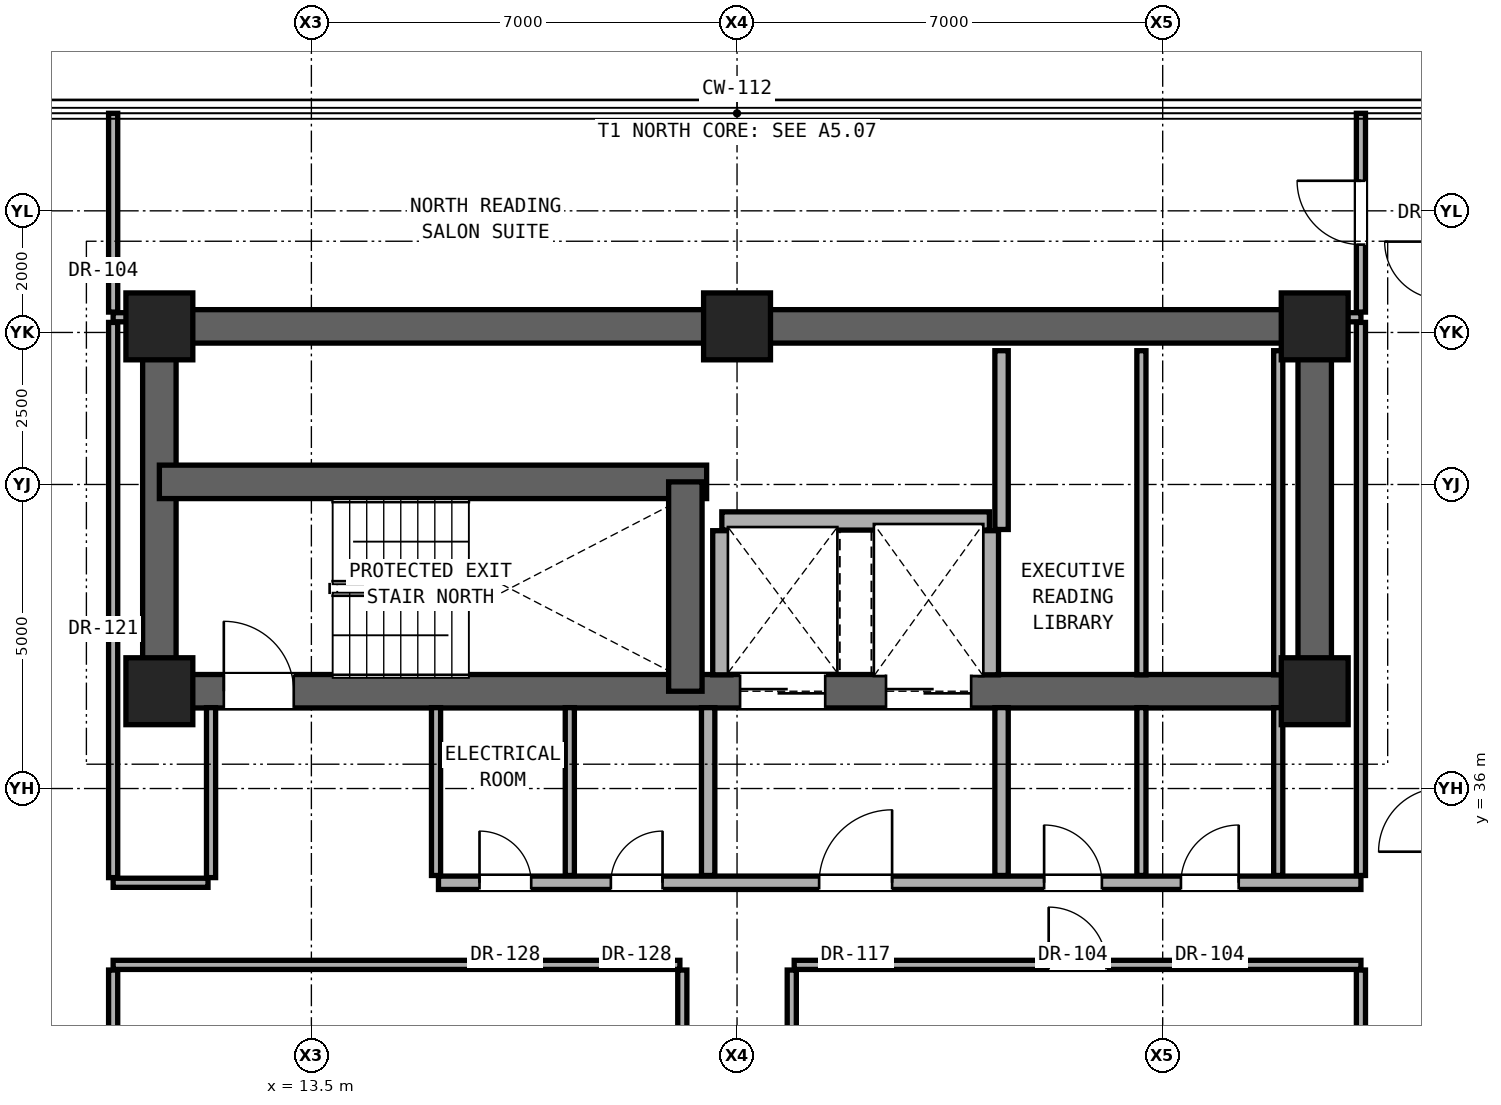
"""IFC4 building model, lengths in metres.
Left out: names, types, materials, properties, quantities, classifications, styles, units other than length and angle.
Written with IfcOpenShell. Run it as: python <this file> out.ifc"""

import sys

from ifc_helpers import new_model, si_unit, direction, frame, frame_2d, origin, origin_2d, place, context, subcontext, project, spatial, rectangle, extrude, element, fill, save


model = new_model("IFC4")
c1 = context("Model", 3, precision=1e-05, world=origin(), true_north=direction((0.0, 1.0)))
c2 = subcontext(c1, "Body", "Model", "MODEL_VIEW")
j1 = project(units=[si_unit("LENGTHUNIT", "METRE"), si_unit("PLANEANGLEUNIT", "RADIAN")], contexts=[c1])
p1 = place(None, origin())
s1 = spatial("IfcSite", under=j1, at=p1, CompositionType="ELEMENT")
p2 = place(p1, origin())
s2 = spatial("IfcBuilding", under=s1, at=p2, CompositionType="ELEMENT")
p3 = place(p2, frame((0.0, 0.0, 144.5)))
s3 = spatial("IfcBuildingStorey", under=s2, at=p3, CompositionType="ELEMENT", Elevation=144.5)
for number, where, z_axis, x_axis in (
    (1, (11.0, 37.6, 0.0), (0.0, 0.0, 1.0), (1.0, 0.0, 0.0)),
    (2, (30.0, 37.6, 0.0), (0.0, 0.0, 1.0), (1.0, 0.0, 0.0)),
    (3, (11.0, 43.6, 0.0), (0.0, 0.0, 1.0), (1.0, 0.0, 0.0)),
    (4, (20.5, 43.6, 0.0), (0.0, 0.0, 1.0), (1.0, 0.0, 0.0)),
    (5, (30.0, 43.6, 0.0), (0.0, 0.0, 1.0), (1.0, 0.0, 0.0)),
):
    element("IfcColumn", number, at=place(p3, frame(where, z_axis=z_axis, x_axis=x_axis)), inside=s3, PredefinedType="COLUMN", context=c2, shape_type="SweptSolid", body=[
        extrude(rectangle(XDim=1.1, YDim=1.1, at=origin_2d()), origin(), (0.0, 0.0, 1.0), 3.3),
    ])
p4 = place(p3, frame((11.0, 43.6, 0.0), z_axis=(0.0, 0.0, 1.0), x_axis=(1.0, 0.0, 0.0)))
e6 = element("IfcWall", 6, at=p4, inside=s3, PredefinedType="SHEAR", context=c2, shape_type="SweptSolid", body=[
    extrude(rectangle(XDim=19.0, YDim=0.55, at=frame_2d((9.5, 0.0))), origin(), (0.0, 0.0, 1.0), 2.94),
])
for number, where, z_axis, x_axis in (
    (7, (11.0, 37.6, 0.0), (0.0, 0.0, 1.0), (0.0, 1.0, 0.0)),
    (8, (30.0, 37.6, 0.0), (0.0, 0.0, 1.0), (0.0, 1.0, 0.0)),
):
    element("IfcWall", number, at=place(p3, frame(where, z_axis=z_axis, x_axis=x_axis)), inside=s3, PredefinedType="SHEAR", context=c2, shape_type="SweptSolid", body=[
        extrude(rectangle(XDim=6.0, YDim=0.55, at=frame_2d((3.0, 0.0))), origin(), (0.0, 0.0, 1.0), 2.94),
    ])
p5 = place(p3, frame((11.0, 37.6, 0.0), z_axis=(0.0, 0.0, 1.0), x_axis=(1.0, 0.0, 0.0)))
e9 = element("IfcWall", 9, at=p5, inside=s3, PredefinedType="SHEAR", context=c2, shape_type="SweptSolid", body=[
    extrude(rectangle(XDim=19.0, YDim=0.55, at=frame_2d((9.5, 0.0))), origin(), (0.0, 0.0, 1.0), 2.94),
])
p6 = place(p5, frame((1.06, 0.0, 0.0)))
e10 = element("IfcOpeningElement", 10, at=p6, cuts=e9, PredefinedType="OPENING", context=c2, shape_type="SweptSolid", body=[
    extrude(rectangle(XDim=1.15, YDim=2.2, at=frame_2d((0.575, 1.1))), frame((0.0, 0.285, 0.0), z_axis=(0.0, -1.0, 0.0), x_axis=(1.0, 0.0, 0.0)), (0.0, 0.0, 1.0), 0.57),
])
p7 = place(p5, frame((9.55, 0.0, 0.0)))
e11 = element("IfcOpeningElement", 11, at=p7, cuts=e9, PredefinedType="OPENING", context=c2, shape_type="SweptSolid", body=[
    extrude(rectangle(XDim=1.4, YDim=2.35, at=frame_2d((0.7, 1.175))), frame((0.0, 0.285, 0.0), z_axis=(0.0, -1.0, 0.0), x_axis=(1.0, 0.0, 0.0)), (0.0, 0.0, 1.0), 0.57),
])
p8 = place(p5, frame((11.95, 0.0, 0.0)))
e12 = element("IfcOpeningElement", 12, at=p8, cuts=e9, PredefinedType="OPENING", context=c2, shape_type="SweptSolid", body=[
    extrude(rectangle(XDim=1.4, YDim=2.35, at=frame_2d((0.7, 1.175))), frame((0.0, 0.285, 0.0), z_axis=(0.0, -1.0, 0.0), x_axis=(1.0, 0.0, 0.0)), (0.0, 0.0, 1.0), 0.57),
])
p9 = place(p3, frame((11.0, 41.043, 0.0), z_axis=(0.0, 0.0, 1.0), x_axis=(1.0, 0.0, 0.0)))
e13 = element("IfcWall", 13, at=p9, inside=s3, PredefinedType="SHEAR", context=c2, shape_type="SweptSolid", body=[
    extrude(rectangle(XDim=9.0, YDim=0.55, at=frame_2d((4.5, 0.0))), origin(), (0.0, 0.0, 1.0), 2.94),
])
p10 = place(p3, frame((19.65, 37.6, 0.0), z_axis=(0.0, 0.0, 1.0), x_axis=(0.0, 1.0, 0.0)))
e14 = element("IfcWall", 14, at=p10, inside=s3, PredefinedType="SHEAR", context=c2, shape_type="SweptSolid", body=[
    extrude(rectangle(XDim=3.443, YDim=0.55, at=frame_2d((1.721, 0.0))), origin(), (0.0, 0.0, 1.0), 2.94),
])
p11 = place(p3, frame((10.24, 33.1, 0.0), z_axis=(0.0, 0.0, 1.0), x_axis=(1.0, 0.0, 0.0)))
e15 = element("IfcWall", 15, at=p11, inside=s3, PredefinedType="PARTITIONING", context=c2, shape_type="SweptSolid", body=[
    extrude(rectangle(XDim=9.32, YDim=0.15, at=frame_2d((4.66, 0.0))), origin(), (0.0, 0.0, 1.0), 2.316),
])
p12 = place(p3, frame((21.44, 33.1, 0.0), z_axis=(0.0, 0.0, 1.0), x_axis=(1.0, 0.0, 0.0)))
e16 = element("IfcWall", 16, at=p12, inside=s3, PredefinedType="PARTITIONING", context=c2, shape_type="SweptSolid", body=[
    extrude(rectangle(XDim=9.32, YDim=0.15, at=frame_2d((4.66, 0.0))), origin(), (0.0, 0.0, 1.0), 2.316),
])
p13 = place(p12, frame((4.185, 0.0, 0.0)))
e17 = element("IfcOpeningElement", 17, at=p13, cuts=e16, PredefinedType="OPENING", context=c2, shape_type="SweptSolid", body=[
    extrude(rectangle(XDim=0.95, YDim=2.15, at=frame_2d((0.475, 1.075))), frame((0.0, 0.085, 0.0), z_axis=(0.0, -1.0, 0.0), x_axis=(1.0, 0.0, 0.0)), (0.0, 0.0, 1.0), 0.17),
])
p14 = place(p3, frame((10.24, 34.45, 0.0), z_axis=(0.0, 0.0, 1.0), x_axis=(1.0, 0.0, 0.0)))
e18 = element("IfcWall", 18, at=p14, inside=s3, PredefinedType="PARTITIONING", context=c2, shape_type="SweptSolid", body=[
    extrude(rectangle(XDim=1.56, YDim=0.15, at=frame_2d((0.78, 0.0))), origin(), (0.0, 0.0, 1.0), 2.316),
])
p15 = place(p3, frame((15.59, 34.45, 0.0), z_axis=(0.0, 0.0, 1.0), x_axis=(1.0, 0.0, 0.0)))
e19 = element("IfcWall", 19, at=p15, inside=s3, PredefinedType="SOLIDWALL", context=c2, shape_type="SweptSolid", body=[
    extrude(rectangle(XDim=15.17, YDim=0.22, at=frame_2d((7.585, 0.0))), origin(), (0.0, 0.0, 1.0), 2.316),
])
p16 = place(p15, frame((6.26, 0.0, 0.0)))
e20 = element("IfcOpeningElement", 20, at=p16, cuts=e19, PredefinedType="OPENING", context=c2, shape_type="SweptSolid", body=[
    extrude(rectangle(XDim=1.2, YDim=2.25, at=frame_2d((0.6, 1.125))), frame((0.0, 0.12, 0.0), z_axis=(0.0, -1.0, 0.0), x_axis=(1.0, 0.0, 0.0)), (0.0, 0.0, 1.0), 0.24),
])
p17 = place(p15, frame((9.96, 0.0, 0.0)))
e21 = element("IfcOpeningElement", 21, at=p17, cuts=e19, PredefinedType="OPENING", context=c2, shape_type="SweptSolid", body=[
    extrude(rectangle(XDim=0.95, YDim=2.15, at=frame_2d((0.475, 1.075))), frame((0.0, 0.12, 0.0), z_axis=(0.0, -1.0, 0.0), x_axis=(1.0, 0.0, 0.0)), (0.0, 0.0, 1.0), 0.24),
])
p18 = place(p15, frame((12.21, 0.0, 0.0)))
e22 = element("IfcOpeningElement", 22, at=p18, cuts=e19, PredefinedType="OPENING", context=c2, shape_type="SweptSolid", body=[
    extrude(rectangle(XDim=0.95, YDim=2.15, at=frame_2d((0.475, 1.075))), frame((0.0, 0.12, 0.0), z_axis=(0.0, -1.0, 0.0), x_axis=(1.0, 0.0, 0.0)), (0.0, 0.0, 1.0), 0.24),
])
p19 = place(p15, frame((0.675, 0.0, 0.0)))
e23 = element("IfcOpeningElement", 23, at=p19, cuts=e19, PredefinedType="OPENING", context=c2, shape_type="SweptSolid", body=[
    extrude(rectangle(XDim=0.85, YDim=2.01, at=frame_2d((0.425, 1.005))), frame((0.0, 0.12, 0.0), z_axis=(0.0, -1.0, 0.0), x_axis=(1.0, 0.0, 0.0)), (0.0, 0.0, 1.0), 0.24),
])
p20 = place(p15, frame((2.835, 0.0, 0.0)))
e24 = element("IfcOpeningElement", 24, at=p20, cuts=e19, PredefinedType="OPENING", context=c2, shape_type="SweptSolid", body=[
    extrude(rectangle(XDim=0.85, YDim=2.01, at=frame_2d((0.425, 1.005))), frame((0.0, 0.12, 0.0), z_axis=(0.0, -1.0, 0.0), x_axis=(1.0, 0.0, 0.0)), (0.0, 0.0, 1.0), 0.24),
])
p21 = place(p3, frame((20.25, 40.4, 0.0), z_axis=(0.0, 0.0, 1.0), x_axis=(1.0, 0.0, 0.0)))
e25 = element("IfcWall", 25, at=p21, inside=s3, PredefinedType="SOLIDWALL", context=c2, shape_type="SweptSolid", body=[
    extrude(rectangle(XDim=4.4, YDim=0.3, at=frame_2d((2.2, 0.0))), origin(), (0.0, 0.0, 1.0), 2.94),
])
for number, where, z_axis, x_axis in (
    (26, (10.24, 43.75, 0.0), (0.0, 0.0, 1.0), (1.0, 0.0, 0.0)),
    (27, (30.27, 43.75, 0.0), (0.0, 0.0, 1.0), (1.0, 0.0, 0.0)),
):
    element("IfcWall", number, at=place(p3, frame(where, z_axis=z_axis, x_axis=x_axis)), inside=s3, PredefinedType="PARTITIONING", context=c2, shape_type="SweptSolid", body=[
        extrude(rectangle(XDim=0.49, YDim=0.15, at=frame_2d((0.245, 0.0))), origin(), (0.0, 0.0, 1.0), 2.94),
    ])
p22 = place(p3, frame((10.24, 27.485, 0.0), z_axis=(0.0, 0.0, 1.0), x_axis=(0.0, 1.0, 0.0)))
e28 = element("IfcWall", 28, at=p22, inside=s3, PredefinedType="PARTITIONING", context=c2, shape_type="SweptSolid", body=[
    extrude(rectangle(XDim=5.53, YDim=0.15, at=frame_2d((2.765, 0.0))), origin(), (0.0, 0.0, 1.0), 2.316),
])
p23 = place(p22, frame((2.29, 0.0, 0.0)))
e29 = element("IfcOpeningElement", 29, at=p23, cuts=e28, PredefinedType="OPENING", context=c2, shape_type="SweptSolid", body=[
    extrude(rectangle(XDim=0.95, YDim=2.15, at=frame_2d((0.475, 1.075))), frame((0.0, 0.085, 0.0), z_axis=(0.0, -1.0, 0.0), x_axis=(1.0, 0.0, 0.0)), (0.0, 0.0, 1.0), 0.17),
])
p24 = place(p3, frame((10.24, 34.535, 0.0), z_axis=(0.0, 0.0, 1.0), x_axis=(0.0, 1.0, 0.0)))
e30 = element("IfcWall", 30, at=p24, inside=s3, PredefinedType="PARTITIONING", context=c2, shape_type="SweptSolid", body=[
    extrude(rectangle(XDim=9.13, YDim=0.15, at=frame_2d((4.565, 0.0))), origin(), (0.0, 0.0, 1.0), 2.316),
])
p25 = place(p3, frame((10.24, 43.835, 0.0), z_axis=(0.0, 0.0, 1.0), x_axis=(0.0, 1.0, 0.0)))
e31 = element("IfcWall", 31, at=p25, inside=s3, PredefinedType="PARTITIONING", context=c2, shape_type="SweptSolid", body=[
    extrude(rectangle(XDim=3.269, YDim=0.15, at=frame_2d((1.635, 0.0))), origin(), (0.0, 0.0, 1.0), 2.94),
])
p26 = place(p3, frame((11.85, 34.535, 0.0), z_axis=(0.0, 0.0, 1.0), x_axis=(0.0, 1.0, 0.0)))
e32 = element("IfcWall", 32, at=p26, inside=s3, PredefinedType="PARTITIONING", context=c2, shape_type="SweptSolid", body=[
    extrude(rectangle(XDim=2.795, YDim=0.15, at=frame_2d((1.397, 0.0))), origin(), (0.0, 0.0, 1.0), 2.94),
])
p27 = place(p3, frame((15.55, 34.57, 0.0), z_axis=(0.0, 0.0, 1.0), x_axis=(0.0, 1.0, 0.0)))
e33 = element("IfcWall", 33, at=p27, inside=s3, PredefinedType="PARTITIONING", context=c2, shape_type="SweptSolid", body=[
    extrude(rectangle(XDim=2.76, YDim=0.15, at=frame_2d((1.38, 0.0))), origin(), (0.0, 0.0, 1.0), 2.469),
])
p28 = place(p3, frame((17.75, 34.57, 0.0), z_axis=(0.0, 0.0, 1.0), x_axis=(0.0, 1.0, 0.0)))
e34 = element("IfcWall", 34, at=p28, inside=s3, PredefinedType="PARTITIONING", context=c2, shape_type="SweptSolid", body=[
    extrude(rectangle(XDim=2.76, YDim=0.15, at=frame_2d((1.38, 0.0))), origin(), (0.0, 0.0, 1.0), 2.94),
])
p29 = place(p3, frame((19.6, 27.485, 0.0), z_axis=(0.0, 0.0, 1.0), x_axis=(0.0, 1.0, 0.0)))
e35 = element("IfcWall", 35, at=p29, inside=s3, PredefinedType="PARTITIONING", context=c2, shape_type="SweptSolid", body=[
    extrude(rectangle(XDim=5.53, YDim=0.15, at=frame_2d((2.765, 0.0))), origin(), (0.0, 0.0, 1.0), 2.316),
])
p30 = place(p3, frame((20.025, 34.57, 0.0), z_axis=(0.0, 0.0, 1.0), x_axis=(0.0, 1.0, 0.0)))
e36 = element("IfcWall", 36, at=p30, inside=s3, PredefinedType="SOLIDWALL", context=c2, shape_type="SweptSolid", body=[
    extrude(rectangle(XDim=2.76, YDim=0.22, at=frame_2d((1.38, 0.0))), origin(), (0.0, 0.0, 1.0), 2.94),
])
p31 = place(p3, frame((20.25, 37.87, 0.0), z_axis=(0.0, 0.0, 1.0), x_axis=(0.0, 1.0, 0.0)))
e37 = element("IfcWall", 37, at=p31, inside=s3, PredefinedType="SOLIDWALL", context=c2, shape_type="SweptSolid", body=[
    extrude(rectangle(XDim=2.37, YDim=0.3, at=frame_2d((1.185, 0.0))), origin(), (0.0, 0.0, 1.0), 2.94),
])
p32 = place(p3, frame((21.4, 27.485, 0.0), z_axis=(0.0, 0.0, 1.0), x_axis=(0.0, 1.0, 0.0)))
e38 = element("IfcWall", 38, at=p32, inside=s3, PredefinedType="PARTITIONING", context=c2, shape_type="SweptSolid", body=[
    extrude(rectangle(XDim=5.53, YDim=0.15, at=frame_2d((2.765, 0.0))), origin(), (0.0, 0.0, 1.0), 2.316),
])
p33 = place(p3, frame((24.65, 37.87, 0.0), z_axis=(0.0, 0.0, 1.0), x_axis=(0.0, 1.0, 0.0)))
e39 = element("IfcWall", 39, at=p33, inside=s3, PredefinedType="SOLIDWALL", context=c2, shape_type="SweptSolid", body=[
    extrude(rectangle(XDim=2.37, YDim=0.3, at=frame_2d((1.185, 0.0))), origin(), (0.0, 0.0, 1.0), 2.94),
])
p34 = place(p3, frame((24.85, 34.57, 0.0), z_axis=(0.0, 0.0, 1.0), x_axis=(0.0, 1.0, 0.0)))
e40 = element("IfcWall", 40, at=p34, inside=s3, PredefinedType="SOLIDWALL", context=c2, shape_type="SweptSolid", body=[
    extrude(rectangle(XDim=2.76, YDim=0.22, at=frame_2d((1.38, 0.0))), origin(), (0.0, 0.0, 1.0), 2.94),
])
p35 = place(p3, frame((24.85, 40.26, 0.0), z_axis=(0.0, 0.0, 1.0), x_axis=(0.0, 1.0, 0.0)))
e41 = element("IfcWall", 41, at=p35, inside=s3, PredefinedType="SOLIDWALL", context=c2, shape_type="SweptSolid", body=[
    extrude(rectangle(XDim=2.94, YDim=0.22, at=frame_2d((1.47, 0.0))), origin(), (0.0, 0.0, 1.0), 2.94),
])
p36 = place(p3, frame((27.15, 34.57, 0.0), z_axis=(0.0, 0.0, 1.0), x_axis=(0.0, 1.0, 0.0)))
e42 = element("IfcWall", 42, at=p36, inside=s3, PredefinedType="PARTITIONING", context=c2, shape_type="SweptSolid", body=[
    extrude(rectangle(XDim=2.76, YDim=0.15, at=frame_2d((1.38, 0.0))), origin(), (0.0, 0.0, 1.0), 2.94),
])
p37 = place(p3, frame((27.15, 37.87, 0.0), z_axis=(0.0, 0.0, 1.0), x_axis=(0.0, 1.0, 0.0)))
e43 = element("IfcWall", 43, at=p37, inside=s3, PredefinedType="PARTITIONING", context=c2, shape_type="SweptSolid", body=[
    extrude(rectangle(XDim=5.33, YDim=0.15, at=frame_2d((2.665, 0.0))), origin(), (0.0, 0.0, 1.0), 2.94),
])
p38 = place(p3, frame((29.4, 34.57, 0.0), z_axis=(0.0, 0.0, 1.0), x_axis=(0.0, 1.0, 0.0)))
e44 = element("IfcWall", 44, at=p38, inside=s3, PredefinedType="PARTITIONING", context=c2, shape_type="SweptSolid", body=[
    extrude(rectangle(XDim=2.76, YDim=0.15, at=frame_2d((1.38, 0.0))), origin(), (0.0, 0.0, 1.0), 2.94),
])
p39 = place(p3, frame((29.4, 37.87, 0.0), z_axis=(0.0, 0.0, 1.0), x_axis=(0.0, 1.0, 0.0)))
e45 = element("IfcWall", 45, at=p39, inside=s3, PredefinedType="PARTITIONING", context=c2, shape_type="SweptSolid", body=[
    extrude(rectangle(XDim=5.33, YDim=0.15, at=frame_2d((2.665, 0.0))), origin(), (0.0, 0.0, 1.0), 2.94),
])
p40 = place(p3, frame((30.76, 27.485, 0.0), z_axis=(0.0, 0.0, 1.0), x_axis=(0.0, 1.0, 0.0)))
e46 = element("IfcWall", 46, at=p40, inside=s3, PredefinedType="PARTITIONING", context=c2, shape_type="SweptSolid", body=[
    extrude(rectangle(XDim=5.53, YDim=0.15, at=frame_2d((2.765, 0.0))), origin(), (0.0, 0.0, 1.0), 2.316),
])
p41 = place(p3, frame((30.76, 34.57, 0.0), z_axis=(0.0, 0.0, 1.0), x_axis=(0.0, 1.0, 0.0)))
e47 = element("IfcWall", 47, at=p41, inside=s3, PredefinedType="PARTITIONING", context=c2, shape_type="SweptSolid", body=[
    extrude(rectangle(XDim=9.095, YDim=0.15, at=frame_2d((4.547, 0.0))), origin(), (0.0, 0.0, 1.0), 2.316),
])
p42 = place(p3, frame((30.76, 43.835, 0.0), z_axis=(0.0, 0.0, 1.0), x_axis=(0.0, 1.0, 0.0)))
e48 = element("IfcWall", 48, at=p42, inside=s3, PredefinedType="PARTITIONING", context=c2, shape_type="SweptSolid", body=[
    extrude(rectangle(XDim=3.269, YDim=0.15, at=frame_2d((1.635, 0.0))), origin(), (0.0, 0.0, 1.0), 2.94),
])
p43 = place(p42, frame((1.11, 0.0, 0.0)))
e49 = element("IfcOpeningElement", 49, at=p43, cuts=e48, PredefinedType="OPENING", context=c2, shape_type="SweptSolid", body=[
    extrude(rectangle(XDim=1.05, YDim=2.2, at=frame_2d((0.525, 1.1))), frame((0.0, 0.085, 0.0), z_axis=(0.0, -1.0, 0.0), x_axis=(1.0, 0.0, 0.0)), (0.0, 0.0, 1.0), 0.17),
])
p44 = place(p6, origin())
e50 = element("IfcDoor", 50, at=p44, inside=s3, OperationType="SINGLE_SWING_LEFT", PredefinedType="DOOR", context=c2, shape_type="SweptSolid", body=[
    extrude(rectangle(XDim=1.15, YDim=2.2, at=frame_2d((0.575, 1.1))), frame((0.0, 0.025, 0.0), z_axis=(0.0, -1.0, 0.0), x_axis=(1.0, 0.0, 0.0)), (0.0, 0.0, 1.0), 0.05),
])
fill(e10, e50)
p45 = place(p16, origin())
e51 = element("IfcDoor", 51, at=p45, inside=s3, OperationType="SINGLE_SWING_RIGHT", PredefinedType="DOOR", context=c2, shape_type="SweptSolid", body=[
    extrude(rectangle(XDim=1.2, YDim=2.25, at=frame_2d((0.6, 1.125))), frame((0.0, 0.025, 0.0), z_axis=(0.0, -1.0, 0.0), x_axis=(1.0, 0.0, 0.0)), (0.0, 0.0, 1.0), 0.05),
])
fill(e20, e51)
p46 = place(p17, origin())
e52 = element("IfcDoor", 52, at=p46, inside=s3, OperationType="SINGLE_SWING_LEFT", PredefinedType="DOOR", context=c2, shape_type="SweptSolid", body=[
    extrude(rectangle(XDim=0.95, YDim=2.15, at=frame_2d((0.475, 1.075))), frame((0.0, 0.025, 0.0), z_axis=(0.0, -1.0, 0.0), x_axis=(1.0, 0.0, 0.0)), (0.0, 0.0, 1.0), 0.05),
])
fill(e21, e52)
p47 = place(p18, origin())
e53 = element("IfcDoor", 53, at=p47, inside=s3, OperationType="SINGLE_SWING_RIGHT", PredefinedType="DOOR", context=c2, shape_type="SweptSolid", body=[
    extrude(rectangle(XDim=0.95, YDim=2.15, at=frame_2d((0.475, 1.075))), frame((0.0, 0.025, 0.0), z_axis=(0.0, -1.0, 0.0), x_axis=(1.0, 0.0, 0.0)), (0.0, 0.0, 1.0), 0.05),
])
fill(e22, e53)
p48 = place(p19, origin())
e54 = element("IfcDoor", 54, at=p48, inside=s3, OperationType="SINGLE_SWING_LEFT", PredefinedType="DOOR", context=c2, shape_type="SweptSolid", body=[
    extrude(rectangle(XDim=0.85, YDim=2.01, at=frame_2d((0.425, 1.005))), frame((0.0, 0.025, 0.0), z_axis=(0.0, -1.0, 0.0), x_axis=(1.0, 0.0, 0.0)), (0.0, 0.0, 1.0), 0.05),
])
fill(e23, e54)
p49 = place(p20, origin())
e55 = element("IfcDoor", 55, at=p49, inside=s3, OperationType="SINGLE_SWING_RIGHT", PredefinedType="DOOR", context=c2, shape_type="SweptSolid", body=[
    extrude(rectangle(XDim=0.85, YDim=2.01, at=frame_2d((0.425, 1.005))), frame((0.0, 0.025, 0.0), z_axis=(0.0, -1.0, 0.0), x_axis=(1.0, 0.0, 0.0)), (0.0, 0.0, 1.0), 0.05),
])
fill(e24, e55)
p50 = place(p13, origin())
e56 = element("IfcDoor", 56, at=p50, inside=s3, OperationType="SINGLE_SWING_LEFT", PredefinedType="DOOR", context=c2, shape_type="SweptSolid", body=[
    extrude(rectangle(XDim=0.95, YDim=2.15, at=frame_2d((0.475, 1.075))), frame((0.0, 0.025, 0.0), z_axis=(0.0, -1.0, 0.0), x_axis=(1.0, 0.0, 0.0)), (0.0, 0.0, 1.0), 0.05),
])
fill(e17, e56)
p51 = place(p43, origin())
e57 = element("IfcDoor", 57, at=p51, inside=s3, OperationType="SINGLE_SWING_RIGHT", PredefinedType="DOOR", context=c2, shape_type="SweptSolid", body=[
    extrude(rectangle(XDim=1.05, YDim=2.2, at=frame_2d((0.525, 1.1))), frame((0.0, 0.025, 0.0), z_axis=(0.0, -1.0, 0.0), x_axis=(1.0, 0.0, 0.0)), (0.0, 0.0, 1.0), 0.05),
])
fill(e49, e57)
p52 = place(p7, origin())
e58 = element("IfcDoor", 58, at=p52, inside=s3, OperationType="DOUBLE_DOOR_SLIDING", PredefinedType="DOOR", context=c2, shape_type="SweptSolid", body=[
    extrude(rectangle(XDim=1.4, YDim=2.35, at=frame_2d((0.7, 1.175))), frame((0.0, 0.025, 0.0), z_axis=(0.0, -1.0, 0.0), x_axis=(1.0, 0.0, 0.0)), (0.0, 0.0, 1.0), 0.05),
])
fill(e11, e58)
p53 = place(p8, origin())
e59 = element("IfcDoor", 59, at=p53, inside=s3, OperationType="DOUBLE_DOOR_SLIDING", PredefinedType="DOOR", context=c2, shape_type="SweptSolid", body=[
    extrude(rectangle(XDim=1.4, YDim=2.35, at=frame_2d((0.7, 1.175))), frame((0.0, 0.025, 0.0), z_axis=(0.0, -1.0, 0.0), x_axis=(1.0, 0.0, 0.0)), (0.0, 0.0, 1.0), 0.05),
])
fill(e12, e59)
save(model, sys.argv[1])
